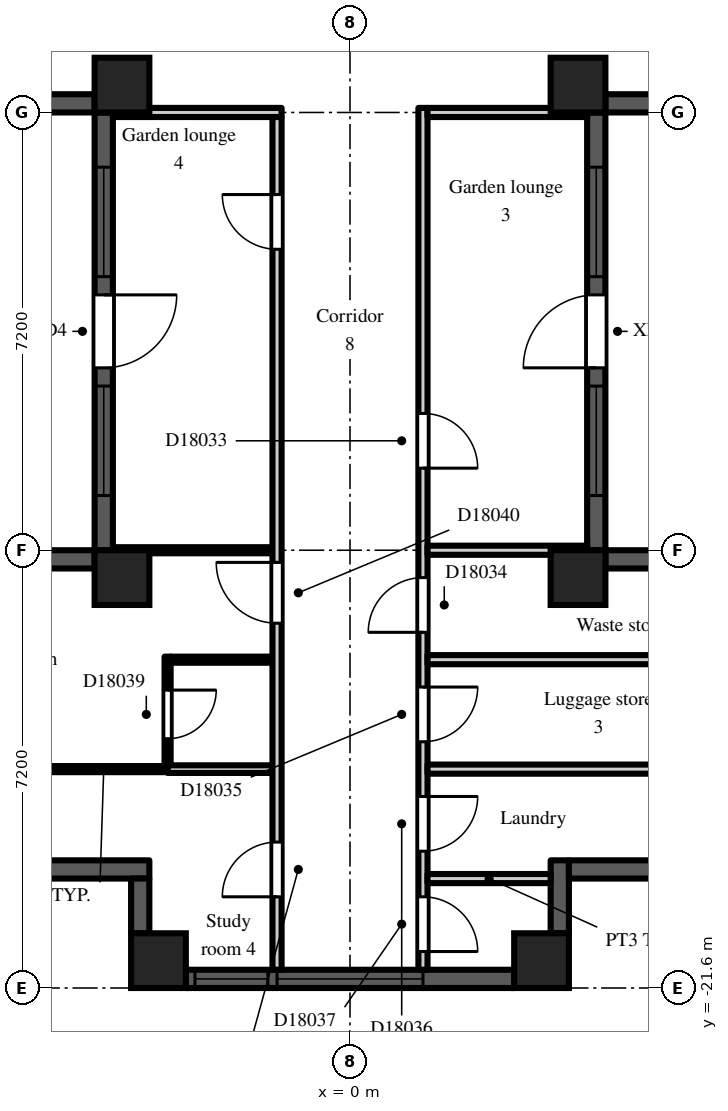
"""IFC4 building model, lengths in metres.
Left out: names, types, materials, properties, quantities, classifications, styles, units other than length and angle.
Written with IfcOpenShell. Run it as: python <this file> out.ifc"""

import sys

from ifc_helpers import new_model, si_unit, direction, frame, frame_2d, origin, origin_2d, place, context, subcontext, project, spatial, rectangle, extrude, element, fill, save


model = new_model("IFC4")
c1 = context("Model", 3, precision=1e-05, world=origin(), true_north=direction((0.0, 1.0)))
c2 = subcontext(c1, "Body", "Model", "MODEL_VIEW")
j1 = project(units=[si_unit("LENGTHUNIT", "METRE"), si_unit("PLANEANGLEUNIT", "RADIAN")], contexts=[c1])
p1 = place(None, origin())
s1 = spatial("IfcSite", under=j1, at=p1, CompositionType="ELEMENT")
p2 = place(p1, origin())
s2 = spatial("IfcBuilding", under=s1, at=p2, CompositionType="ELEMENT")
p3 = place(p2, frame((0.0, 0.0, 123.3)))
s3 = spatial("IfcBuildingStorey", under=s2, at=p3, CompositionType="ELEMENT", Elevation=123.3)
for number, where, z_axis, x_axis in (
    (1, (-3.75, -14.85, 0.0), (0.0, 0.0, 1.0), (1.0, 0.0, 0.0)),
    (2, (-3.75, -6.75, 0.0), (0.0, 0.0, 1.0), (1.0, 0.0, 0.0)),
    (3, (-3.15, -21.15, 0.0), (0.0, 0.0, 1.0), (1.0, 0.0, 0.0)),
    (4, (3.15, -21.15, 0.0), (0.0, 0.0, 1.0), (1.0, 0.0, 0.0)),
    (5, (3.75, -14.85, 0.0), (0.0, 0.0, 1.0), (1.0, 0.0, 0.0)),
    (6, (3.75, -6.75, 0.0), (0.0, 0.0, 1.0), (1.0, 0.0, 0.0)),
):
    element("IfcColumn", number, at=place(p3, frame(where, z_axis=z_axis, x_axis=x_axis)), inside=s3, PredefinedType="COLUMN", context=c2, shape_type="SweptSolid", body=[
        extrude(rectangle(XDim=0.9, YDim=0.9, at=origin_2d()), origin(), (0.0, 0.0, 1.0), 3.0),
    ])
p4 = place(p3, frame((-7.2, -7.05, 0.0), z_axis=(0.0, 0.0, 1.0), x_axis=(1.0, 0.0, 0.0)))
e7 = element("IfcWall", 7, at=p4, inside=s3, PredefinedType="SOLIDWALL", context=c2, shape_type="SweptSolid", body=[
    extrude(rectangle(XDim=3.0, YDim=0.3, at=frame_2d((1.5, 0.0))), origin(), (0.0, 0.0, 1.0), 2.2),
])
p5 = place(p3, frame((-4.05, -7.2, 0.0), z_axis=(0.0, 0.0, 1.0), x_axis=(0.0, -1.0, 0.0)))
e8 = element("IfcWall", 8, at=p5, inside=s3, PredefinedType="SOLIDWALL", context=c2, shape_type="SweptSolid", body=[
    extrude(rectangle(XDim=7.2, YDim=0.3, at=frame_2d((3.6, 0.0))), origin(), (0.0, 0.0, 1.0), 2.2),
])
p6 = place(p5, frame((3.0, 0.0, 0.0)))
e9 = element("IfcOpeningElement", 9, at=p6, cuts=e8, PredefinedType="OPENING", context=c2, shape_type="SweptSolid", body=[
    extrude(rectangle(XDim=1.2, YDim=2.05, at=frame_2d((0.6, 1.025))), frame((0.0, 0.16, 0.0), z_axis=(0.0, -1.0, 0.0), x_axis=(1.0, 0.0, 0.0)), (0.0, 0.0, 1.0), 0.32),
])
p7 = place(p5, frame((0.9, 0.0, 0.2)))
e10 = element("IfcOpeningElement", 10, at=p7, cuts=e8, PredefinedType="OPENING", context=c2, shape_type="SweptSolid", body=[
    extrude(rectangle(XDim=1.8, YDim=1.85, at=frame_2d((0.9, 0.925))), frame((0.0, 0.16, 0.0), z_axis=(0.0, -1.0, 0.0), x_axis=(1.0, 0.0, 0.0)), (0.0, 0.0, 1.0), 0.32),
])
p8 = place(p5, frame((4.5, 0.0, 0.2)))
e11 = element("IfcOpeningElement", 11, at=p8, cuts=e8, PredefinedType="OPENING", context=c2, shape_type="SweptSolid", body=[
    extrude(rectangle(XDim=1.8, YDim=1.85, at=frame_2d((0.9, 0.925))), frame((0.0, 0.16, 0.0), z_axis=(0.0, -1.0, 0.0), x_axis=(1.0, 0.0, 0.0)), (0.0, 0.0, 1.0), 0.32),
])
p9 = place(p3, frame((-4.2, -14.55, 0.0), z_axis=(0.0, 0.0, 1.0), x_axis=(-1.0, 0.0, 0.0)))
e12 = element("IfcWall", 12, at=p9, inside=s3, PredefinedType="SOLIDWALL", context=c2, shape_type="SweptSolid", body=[
    extrude(rectangle(XDim=2.1, YDim=0.3, at=frame_2d((1.05, 0.0))), origin(), (0.0, 0.0, 1.0), 2.2),
])
p10 = place(p3, frame((-5.1, -19.65, 0.0), z_axis=(0.0, 0.0, 1.0), x_axis=(1.0, 0.0, 0.0)))
e13 = element("IfcWall", 13, at=p10, inside=s3, PredefinedType="SOLIDWALL", context=c2, shape_type="SweptSolid", body=[
    extrude(rectangle(XDim=1.8, YDim=0.3, at=frame_2d((0.9, 0.0))), origin(), (0.0, 0.0, 1.0), 2.6),
])
p11 = place(p3, frame((-3.45, -19.8, 0.0), z_axis=(0.0, 0.0, 1.0), x_axis=(0.0, -1.0, 0.0)))
e14 = element("IfcWall", 14, at=p11, inside=s3, PredefinedType="SOLIDWALL", context=c2, shape_type="SweptSolid", body=[
    extrude(rectangle(XDim=0.9, YDim=0.3, at=frame_2d((0.45, 0.0))), origin(), (0.0, 0.0, 1.0), 2.6),
])
p12 = place(p3, frame((-2.7, -21.45, 0.0), z_axis=(0.0, 0.0, 1.0), x_axis=(1.0, 0.0, 0.0)))
e15 = element("IfcWall", 15, at=p12, inside=s3, PredefinedType="SOLIDWALL", context=c2, shape_type="SweptSolid", body=[
    extrude(rectangle(XDim=5.4, YDim=0.3, at=frame_2d((2.7, 0.0))), origin(), (0.0, 0.0, 1.0), 2.2),
])
p13 = place(p12, frame((1.5, 0.0, 0.2)))
e16 = element("IfcOpeningElement", 16, at=p13, cuts=e15, PredefinedType="OPENING", context=c2, shape_type="SweptSolid", body=[
    extrude(rectangle(XDim=2.4, YDim=1.85, at=frame_2d((1.2, 0.925))), frame((0.0, 0.16, 0.0), z_axis=(0.0, -1.0, 0.0), x_axis=(1.0, 0.0, 0.0)), (0.0, 0.0, 1.0), 0.32),
])
p14 = place(p12, frame((0.15, 0.0, 0.2)))
e17 = element("IfcOpeningElement", 17, at=p14, cuts=e15, PredefinedType="OPENING", context=c2, shape_type="SweptSolid", body=[
    extrude(rectangle(XDim=1.2, YDim=1.85, at=frame_2d((0.6, 0.925))), frame((0.0, 0.16, 0.0), z_axis=(0.0, -1.0, 0.0), x_axis=(1.0, 0.0, 0.0)), (0.0, 0.0, 1.0), 0.32),
])
p15 = place(p3, frame((3.45, -20.7, 0.0), z_axis=(0.0, 0.0, 1.0), x_axis=(0.0, 1.0, 0.0)))
e18 = element("IfcWall", 18, at=p15, inside=s3, PredefinedType="SOLIDWALL", context=c2, shape_type="SweptSolid", body=[
    extrude(rectangle(XDim=1.2, YDim=0.3, at=frame_2d((0.6, 0.0))), origin(), (0.0, 0.0, 1.0), 2.6),
])
p16 = place(p3, frame((3.6, -19.65, 0.0), z_axis=(0.0, 0.0, 1.0), x_axis=(1.0, 0.0, 0.0)))
e19 = element("IfcWall", 19, at=p16, inside=s3, PredefinedType="SOLIDWALL", context=c2, shape_type="SweptSolid", body=[
    extrude(rectangle(XDim=1.8, YDim=0.3, at=frame_2d((0.9, 0.0))), origin(), (0.0, 0.0, 1.0), 2.6),
])
p17 = place(p3, frame((6.3, -14.55, 0.0), z_axis=(0.0, 0.0, 1.0), x_axis=(-1.0, 0.0, 0.0)))
e20 = element("IfcWall", 20, at=p17, inside=s3, PredefinedType="SOLIDWALL", context=c2, shape_type="SweptSolid", body=[
    extrude(rectangle(XDim=2.1, YDim=0.3, at=frame_2d((1.05, 0.0))), origin(), (0.0, 0.0, 1.0), 2.2),
])
p18 = place(p3, frame((4.05, -14.4, 0.0), z_axis=(0.0, 0.0, 1.0), x_axis=(0.0, 1.0, 0.0)))
e21 = element("IfcWall", 21, at=p18, inside=s3, PredefinedType="SOLIDWALL", context=c2, shape_type="SweptSolid", body=[
    extrude(rectangle(XDim=7.2, YDim=0.3, at=frame_2d((3.6, 0.0))), origin(), (0.0, 0.0, 1.0), 2.2),
])
p19 = place(p18, frame((3.0, 0.0, 0.0)))
e22 = element("IfcOpeningElement", 22, at=p19, cuts=e21, PredefinedType="OPENING", context=c2, shape_type="SweptSolid", body=[
    extrude(rectangle(XDim=1.2, YDim=2.05, at=frame_2d((0.6, 1.025))), frame((0.0, 0.16, 0.0), z_axis=(0.0, -1.0, 0.0), x_axis=(1.0, 0.0, 0.0)), (0.0, 0.0, 1.0), 0.32),
])
p20 = place(p18, frame((0.9, 0.0, 0.2)))
e23 = element("IfcOpeningElement", 23, at=p20, cuts=e21, PredefinedType="OPENING", context=c2, shape_type="SweptSolid", body=[
    extrude(rectangle(XDim=1.8, YDim=1.85, at=frame_2d((0.9, 0.925))), frame((0.0, 0.16, 0.0), z_axis=(0.0, -1.0, 0.0), x_axis=(1.0, 0.0, 0.0)), (0.0, 0.0, 1.0), 0.32),
])
p21 = place(p18, frame((4.5, 0.0, 0.2)))
e24 = element("IfcOpeningElement", 24, at=p21, cuts=e21, PredefinedType="OPENING", context=c2, shape_type="SweptSolid", body=[
    extrude(rectangle(XDim=1.8, YDim=1.85, at=frame_2d((0.9, 0.925))), frame((0.0, 0.16, 0.0), z_axis=(0.0, -1.0, 0.0), x_axis=(1.0, 0.0, 0.0)), (0.0, 0.0, 1.0), 0.32),
])
p22 = place(p3, frame((4.2, -7.05, 0.0), z_axis=(0.0, 0.0, 1.0), x_axis=(1.0, 0.0, 0.0)))
e25 = element("IfcWall", 25, at=p22, inside=s3, PredefinedType="SOLIDWALL", context=c2, shape_type="SweptSolid", body=[
    extrude(rectangle(XDim=3.0, YDim=0.3, at=frame_2d((1.5, 0.0))), origin(), (0.0, 0.0, 1.0), 2.2),
])
p23 = place(p3, frame((-5.1, -18.0, 0.0), z_axis=(0.0, 0.0, 1.0), x_axis=(1.0, 0.0, 0.0)))
e26 = element("IfcWall", 26, at=p23, inside=s3, PredefinedType="PARTITIONING", context=c2, shape_type="SweptSolid", body=[
    extrude(rectangle(XDim=2.1, YDim=0.1, at=frame_2d((1.05, 0.0))), origin(), (0.0, 0.0, 1.0), 2.6),
])
p24 = place(p3, frame((-3.9, -14.4, 0.0), z_axis=(0.0, 0.0, 1.0), x_axis=(1.0, 0.0, 0.0)))
e27 = element("IfcWall", 27, at=p24, inside=s3, PredefinedType="PARTITIONING", context=c2, shape_type="SweptSolid", body=[
    extrude(rectangle(XDim=2.625, YDim=0.1, at=frame_2d((1.312, 0.0))), origin(), (0.0, 0.0, 1.0), 2.6),
])
p25 = place(p3, frame((-3.9, -7.2, 0.0), z_axis=(0.0, 0.0, 1.0), x_axis=(1.0, 0.0, 0.0)))
e28 = element("IfcWall", 28, at=p25, inside=s3, PredefinedType="PARTITIONING", context=c2, shape_type="SweptSolid", body=[
    extrude(rectangle(XDim=2.775, YDim=0.15, at=frame_2d((1.387, 0.0))), origin(), (0.0, 0.0, 1.0), 2.6),
])
p26 = place(p3, frame((-3.0, -17.938, 0.0), z_axis=(0.0, 0.0, 1.0), x_axis=(0.0, 1.0, 0.0)))
e29 = element("IfcWall", 29, at=p26, inside=s3, PredefinedType="PARTITIONING", context=c2, shape_type="SweptSolid", body=[
    extrude(rectangle(XDim=1.788, YDim=0.1, at=frame_2d((0.894, 0.0))), origin(), (0.0, 0.0, 1.0), 2.6),
])
p27 = place(p26, frame((0.438, 0.0, 0.0)))
e30 = element("IfcOpeningElement", 30, at=p27, cuts=e29, PredefinedType="OPENING", context=c2, shape_type="SweptSolid", body=[
    extrude(rectangle(XDim=0.8, YDim=2.1, at=frame_2d((0.4, 1.05))), frame((0.0, 0.06, 0.0), z_axis=(0.0, -1.0, 0.0), x_axis=(1.0, 0.0, 0.0)), (0.0, 0.0, 1.0), 0.12),
])
p28 = place(p3, frame((-3.0, -18.0, 0.0), z_axis=(0.0, 0.0, 1.0), x_axis=(1.0, 0.0, 0.0)))
e31 = element("IfcWall", 31, at=p28, inside=s3, PredefinedType="PARTITIONING", context=c2, shape_type="SweptSolid", body=[
    extrude(rectangle(XDim=1.725, YDim=0.125, at=frame_2d((0.863, 0.0))), origin(), (0.0, 0.0, 1.0), 2.6),
])
p29 = place(p3, frame((-2.95, -16.2, 0.0), z_axis=(0.0, 0.0, 1.0), x_axis=(1.0, 0.0, 0.0)))
e32 = element("IfcWall", 32, at=p29, inside=s3, PredefinedType="PARTITIONING", context=c2, shape_type="SweptSolid", body=[
    extrude(rectangle(XDim=1.675, YDim=0.1, at=frame_2d((0.837, 0.0))), origin(), (0.0, 0.0, 1.0), 2.6),
])
p30 = place(p3, frame((-1.2, -21.3, 0.0), z_axis=(0.0, 0.0, 1.0), x_axis=(0.0, 1.0, 0.0)))
e33 = element("IfcWall", 33, at=p30, inside=s3, PredefinedType="PARTITIONING", context=c2, shape_type="SweptSolid", body=[
    extrude(rectangle(XDim=14.025, YDim=0.15, at=frame_2d((7.013, 0.0))), origin(), (0.0, 0.0, 1.0), 2.6),
])
p31 = place(p30, frame((11.85, 0.0, 0.0)))
e34 = element("IfcOpeningElement", 34, at=p31, cuts=e33, PredefinedType="OPENING", context=c2, shape_type="SweptSolid", body=[
    extrude(rectangle(XDim=0.9, YDim=2.1, at=frame_2d((0.45, 1.05))), frame((0.0, 0.085, 0.0), z_axis=(0.0, -1.0, 0.0), x_axis=(1.0, 0.0, 0.0)), (0.0, 0.0, 1.0), 0.17),
])
p32 = place(p30, frame((5.7, 0.0, 0.0)))
e35 = element("IfcOpeningElement", 35, at=p32, cuts=e33, PredefinedType="OPENING", context=c2, shape_type="SweptSolid", body=[
    extrude(rectangle(XDim=1.0, YDim=2.1, at=frame_2d((0.5, 1.05))), frame((0.0, 0.085, 0.0), z_axis=(0.0, -1.0, 0.0), x_axis=(1.0, 0.0, 0.0)), (0.0, 0.0, 1.0), 0.17),
])
p33 = place(p30, frame((1.2, 0.0, 0.0)))
e36 = element("IfcOpeningElement", 36, at=p33, cuts=e33, PredefinedType="OPENING", context=c2, shape_type="SweptSolid", body=[
    extrude(rectangle(XDim=0.9, YDim=2.1, at=frame_2d((0.45, 1.05))), frame((0.0, 0.085, 0.0), z_axis=(0.0, -1.0, 0.0), x_axis=(1.0, 0.0, 0.0)), (0.0, 0.0, 1.0), 0.17),
])
p34 = place(p3, frame((1.2, -21.3, 0.0), z_axis=(0.0, 0.0, 1.0), x_axis=(0.0, 1.0, 0.0)))
e37 = element("IfcWall", 37, at=p34, inside=s3, PredefinedType="PARTITIONING", context=c2, shape_type="SweptSolid", body=[
    extrude(rectangle(XDim=14.175, YDim=0.15, at=frame_2d((7.087, 0.0))), origin(), (0.0, 0.0, 1.0), 2.6),
])
p35 = place(p34, frame((8.25, 0.0, 0.0)))
e38 = element("IfcOpeningElement", 38, at=p35, cuts=e37, PredefinedType="OPENING", context=c2, shape_type="SweptSolid", body=[
    extrude(rectangle(XDim=0.9, YDim=2.1, at=frame_2d((0.45, 1.05))), frame((0.0, 0.085, 0.0), z_axis=(0.0, -1.0, 0.0), x_axis=(1.0, 0.0, 0.0)), (0.0, 0.0, 1.0), 0.17),
])
p36 = place(p34, frame((5.55, 0.0, 0.0)))
e39 = element("IfcOpeningElement", 39, at=p36, cuts=e37, PredefinedType="OPENING", context=c2, shape_type="SweptSolid", body=[
    extrude(rectangle(XDim=0.9, YDim=2.1, at=frame_2d((0.45, 1.05))), frame((0.0, 0.085, 0.0), z_axis=(0.0, -1.0, 0.0), x_axis=(1.0, 0.0, 0.0)), (0.0, 0.0, 1.0), 0.17),
])
p37 = place(p34, frame((3.75, 0.0, 0.0)))
e40 = element("IfcOpeningElement", 40, at=p37, cuts=e37, PredefinedType="OPENING", context=c2, shape_type="SweptSolid", body=[
    extrude(rectangle(XDim=0.9, YDim=2.1, at=frame_2d((0.45, 1.05))), frame((0.0, 0.085, 0.0), z_axis=(0.0, -1.0, 0.0), x_axis=(1.0, 0.0, 0.0)), (0.0, 0.0, 1.0), 0.17),
])
p38 = place(p34, frame((1.95, 0.0, 0.0)))
e41 = element("IfcOpeningElement", 41, at=p38, cuts=e37, PredefinedType="OPENING", context=c2, shape_type="SweptSolid", body=[
    extrude(rectangle(XDim=0.9, YDim=2.1, at=frame_2d((0.45, 1.05))), frame((0.0, 0.085, 0.0), z_axis=(0.0, -1.0, 0.0), x_axis=(1.0, 0.0, 0.0)), (0.0, 0.0, 1.0), 0.17),
])
p39 = place(p34, frame((0.3, 0.0, 0.0)))
e42 = element("IfcOpeningElement", 42, at=p39, cuts=e37, PredefinedType="OPENING", context=c2, shape_type="SweptSolid", body=[
    extrude(rectangle(XDim=0.9, YDim=2.1, at=frame_2d((0.45, 1.05))), frame((0.0, 0.085, 0.0), z_axis=(0.0, -1.0, 0.0), x_axis=(1.0, 0.0, 0.0)), (0.0, 0.0, 1.0), 0.17),
])
p40 = place(p3, frame((1.275, -19.8, 0.0), z_axis=(0.0, 0.0, 1.0), x_axis=(1.0, 0.0, 0.0)))
e43 = element("IfcWall", 43, at=p40, inside=s3, PredefinedType="PARTITIONING", context=c2, shape_type="SweptSolid", body=[
    extrude(rectangle(XDim=2.025, YDim=0.15, at=frame_2d((1.013, 0.0))), origin(), (0.0, 0.0, 1.0), 2.6),
])
p41 = place(p3, frame((1.275, -18.0, 0.0), z_axis=(0.0, 0.0, 1.0), x_axis=(1.0, 0.0, 0.0)))
e44 = element("IfcWall", 44, at=p41, inside=s3, PredefinedType="PARTITIONING", context=c2, shape_type="SweptSolid", body=[
    extrude(rectangle(XDim=3.825, YDim=0.15, at=frame_2d((1.913, 0.0))), origin(), (0.0, 0.0, 1.0), 2.6),
])
p42 = place(p3, frame((1.275, -16.2, 0.0), z_axis=(0.0, 0.0, 1.0), x_axis=(1.0, 0.0, 0.0)))
e45 = element("IfcWall", 45, at=p42, inside=s3, PredefinedType="PARTITIONING", context=c2, shape_type="SweptSolid", body=[
    extrude(rectangle(XDim=5.625, YDim=0.15, at=frame_2d((2.812, 0.0))), origin(), (0.0, 0.0, 1.0), 2.6),
])
for number, where, z_axis, x_axis in (
    (46, (1.275, -14.4, 0.0), (0.0, 0.0, 1.0), (1.0, 0.0, 0.0)),
    (47, (1.275, -7.2, 0.0), (0.0, 0.0, 1.0), (1.0, 0.0, 0.0)),
):
    element("IfcWall", number, at=place(p3, frame(where, z_axis=z_axis, x_axis=x_axis)), inside=s3, PredefinedType="PARTITIONING", context=c2, shape_type="SweptSolid", body=[
        extrude(rectangle(XDim=2.625, YDim=0.15, at=frame_2d((1.312, 0.0))), origin(), (0.0, 0.0, 1.0), 2.6),
    ])
p43 = place(p6, origin())
e48 = element("IfcDoor", 48, at=p43, inside=s3, OperationType="SINGLE_SWING_LEFT", PredefinedType="DOOR", context=c2, shape_type="SweptSolid", body=[
    extrude(rectangle(XDim=1.2, YDim=2.05, at=frame_2d((0.6, 1.025))), frame((0.0, 0.025, 0.0), z_axis=(0.0, -1.0, 0.0), x_axis=(1.0, 0.0, 0.0)), (0.0, 0.0, 1.0), 0.05),
])
fill(e9, e48)
p44 = place(p7, origin())
e49 = element("IfcWindow", 49, at=p44, inside=s3, PartitioningType="SINGLE_PANEL", PredefinedType="WINDOW", context=c2, shape_type="SweptSolid", body=[
    extrude(rectangle(XDim=1.8, YDim=1.85, at=frame_2d((0.9, 0.925))), frame((0.0, 0.03, 0.0), z_axis=(0.0, -1.0, 0.0), x_axis=(1.0, 0.0, 0.0)), (0.0, 0.0, 1.0), 0.06),
])
fill(e10, e49)
p45 = place(p8, origin())
e50 = element("IfcWindow", 50, at=p45, inside=s3, PartitioningType="SINGLE_PANEL", PredefinedType="WINDOW", context=c2, shape_type="SweptSolid", body=[
    extrude(rectangle(XDim=1.8, YDim=1.85, at=frame_2d((0.9, 0.925))), frame((0.0, 0.03, 0.0), z_axis=(0.0, -1.0, 0.0), x_axis=(1.0, 0.0, 0.0)), (0.0, 0.0, 1.0), 0.06),
])
fill(e11, e50)
p46 = place(p13, origin())
e51 = element("IfcWindow", 51, at=p46, inside=s3, PartitioningType="SINGLE_PANEL", PredefinedType="WINDOW", context=c2, shape_type="SweptSolid", body=[
    extrude(rectangle(XDim=2.4, YDim=1.85, at=frame_2d((1.2, 0.925))), frame((0.0, 0.03, 0.0), z_axis=(0.0, -1.0, 0.0), x_axis=(1.0, 0.0, 0.0)), (0.0, 0.0, 1.0), 0.06),
])
fill(e16, e51)
p47 = place(p14, origin())
e52 = element("IfcWindow", 52, at=p47, inside=s3, PartitioningType="SINGLE_PANEL", PredefinedType="WINDOW", context=c2, shape_type="SweptSolid", body=[
    extrude(rectangle(XDim=1.2, YDim=1.85, at=frame_2d((0.6, 0.925))), frame((0.0, 0.03, 0.0), z_axis=(0.0, -1.0, 0.0), x_axis=(1.0, 0.0, 0.0)), (0.0, 0.0, 1.0), 0.06),
])
fill(e17, e52)
p48 = place(p19, origin())
e53 = element("IfcDoor", 53, at=p48, inside=s3, OperationType="SINGLE_SWING_LEFT", PredefinedType="DOOR", context=c2, shape_type="SweptSolid", body=[
    extrude(rectangle(XDim=1.2, YDim=2.05, at=frame_2d((0.6, 1.025))), frame((0.0, 0.025, 0.0), z_axis=(0.0, -1.0, 0.0), x_axis=(1.0, 0.0, 0.0)), (0.0, 0.0, 1.0), 0.05),
])
fill(e22, e53)
p49 = place(p20, origin())
e54 = element("IfcWindow", 54, at=p49, inside=s3, PartitioningType="SINGLE_PANEL", PredefinedType="WINDOW", context=c2, shape_type="SweptSolid", body=[
    extrude(rectangle(XDim=1.8, YDim=1.85, at=frame_2d((0.9, 0.925))), frame((0.0, 0.03, 0.0), z_axis=(0.0, -1.0, 0.0), x_axis=(1.0, 0.0, 0.0)), (0.0, 0.0, 1.0), 0.06),
])
fill(e23, e54)
p50 = place(p21, origin())
e55 = element("IfcWindow", 55, at=p50, inside=s3, PartitioningType="SINGLE_PANEL", PredefinedType="WINDOW", context=c2, shape_type="SweptSolid", body=[
    extrude(rectangle(XDim=1.8, YDim=1.85, at=frame_2d((0.9, 0.925))), frame((0.0, 0.03, 0.0), z_axis=(0.0, -1.0, 0.0), x_axis=(1.0, 0.0, 0.0)), (0.0, 0.0, 1.0), 0.06),
])
fill(e24, e55)
p51 = place(p35, frame((0.9, 0.0, 0.0), z_axis=(0.0, 0.0, 1.0), x_axis=(-1.0, 0.0, 0.0)))
e56 = element("IfcDoor", 56, at=p51, inside=s3, OperationType="SINGLE_SWING_RIGHT", PredefinedType="DOOR", context=c2, shape_type="SweptSolid", body=[
    extrude(rectangle(XDim=0.9, YDim=2.1, at=frame_2d((0.45, 1.05))), frame((0.0, 0.025, 0.0), z_axis=(0.0, -1.0, 0.0), x_axis=(1.0, 0.0, 0.0)), (0.0, 0.0, 1.0), 0.05),
])
fill(e38, e56)
p52 = place(p36, origin())
e57 = element("IfcDoor", 57, at=p52, inside=s3, OperationType="SINGLE_SWING_LEFT", PredefinedType="DOOR", context=c2, shape_type="SweptSolid", body=[
    extrude(rectangle(XDim=0.9, YDim=2.1, at=frame_2d((0.45, 1.05))), frame((0.0, 0.025, 0.0), z_axis=(0.0, -1.0, 0.0), x_axis=(1.0, 0.0, 0.0)), (0.0, 0.0, 1.0), 0.05),
])
fill(e39, e57)
p53 = place(p37, frame((0.9, 0.0, 0.0), z_axis=(0.0, 0.0, 1.0), x_axis=(-1.0, 0.0, 0.0)))
e58 = element("IfcDoor", 58, at=p53, inside=s3, OperationType="SINGLE_SWING_LEFT", PredefinedType="DOOR", context=c2, shape_type="SweptSolid", body=[
    extrude(rectangle(XDim=0.9, YDim=2.1, at=frame_2d((0.45, 1.05))), frame((0.0, 0.025, 0.0), z_axis=(0.0, -1.0, 0.0), x_axis=(1.0, 0.0, 0.0)), (0.0, 0.0, 1.0), 0.05),
])
fill(e40, e58)
p54 = place(p38, frame((0.9, 0.0, 0.0), z_axis=(0.0, 0.0, 1.0), x_axis=(-1.0, 0.0, 0.0)))
e59 = element("IfcDoor", 59, at=p54, inside=s3, OperationType="SINGLE_SWING_LEFT", PredefinedType="DOOR", context=c2, shape_type="SweptSolid", body=[
    extrude(rectangle(XDim=0.9, YDim=2.1, at=frame_2d((0.45, 1.05))), frame((0.0, 0.025, 0.0), z_axis=(0.0, -1.0, 0.0), x_axis=(1.0, 0.0, 0.0)), (0.0, 0.0, 1.0), 0.05),
])
fill(e41, e59)
p55 = place(p39, frame((0.9, 0.0, 0.0), z_axis=(0.0, 0.0, 1.0), x_axis=(-1.0, 0.0, 0.0)))
e60 = element("IfcDoor", 60, at=p55, inside=s3, OperationType="SINGLE_SWING_RIGHT", PredefinedType="DOOR", context=c2, shape_type="SweptSolid", body=[
    extrude(rectangle(XDim=0.9, YDim=2.1, at=frame_2d((0.45, 1.05))), frame((0.0, 0.025, 0.0), z_axis=(0.0, -1.0, 0.0), x_axis=(1.0, 0.0, 0.0)), (0.0, 0.0, 1.0), 0.05),
])
fill(e42, e60)
p56 = place(p31, origin())
e61 = element("IfcDoor", 61, at=p56, inside=s3, OperationType="SINGLE_SWING_RIGHT", PredefinedType="DOOR", context=c2, shape_type="SweptSolid", body=[
    extrude(rectangle(XDim=0.9, YDim=2.1, at=frame_2d((0.45, 1.05))), frame((0.0, 0.025, 0.0), z_axis=(0.0, -1.0, 0.0), x_axis=(1.0, 0.0, 0.0)), (0.0, 0.0, 1.0), 0.05),
])
fill(e34, e61)
p57 = place(p27, frame((0.8, 0.0, 0.0), z_axis=(0.0, 0.0, 1.0), x_axis=(-1.0, 0.0, 0.0)))
e62 = element("IfcDoor", 62, at=p57, inside=s3, OperationType="SINGLE_SWING_LEFT", PredefinedType="DOOR", context=c2, shape_type="SweptSolid", body=[
    extrude(rectangle(XDim=0.8, YDim=2.1, at=frame_2d((0.4, 1.05))), frame((0.0, 0.025, 0.0), z_axis=(0.0, -1.0, 0.0), x_axis=(1.0, 0.0, 0.0)), (0.0, 0.0, 1.0), 0.05),
])
fill(e30, e62)
p58 = place(p32, origin())
e63 = element("IfcDoor", 63, at=p58, inside=s3, OperationType="SINGLE_SWING_RIGHT", PredefinedType="DOOR", context=c2, shape_type="SweptSolid", body=[
    extrude(rectangle(XDim=1.0, YDim=2.1, at=frame_2d((0.5, 1.05))), frame((0.0, 0.025, 0.0), z_axis=(0.0, -1.0, 0.0), x_axis=(1.0, 0.0, 0.0)), (0.0, 0.0, 1.0), 0.05),
])
fill(e35, e63)
p59 = place(p33, origin())
e64 = element("IfcDoor", 64, at=p59, inside=s3, OperationType="SINGLE_SWING_LEFT", PredefinedType="DOOR", context=c2, shape_type="SweptSolid", body=[
    extrude(rectangle(XDim=0.9, YDim=2.1, at=frame_2d((0.45, 1.05))), frame((0.0, 0.025, 0.0), z_axis=(0.0, -1.0, 0.0), x_axis=(1.0, 0.0, 0.0)), (0.0, 0.0, 1.0), 0.05),
])
fill(e36, e64)
save(model, sys.argv[1])
